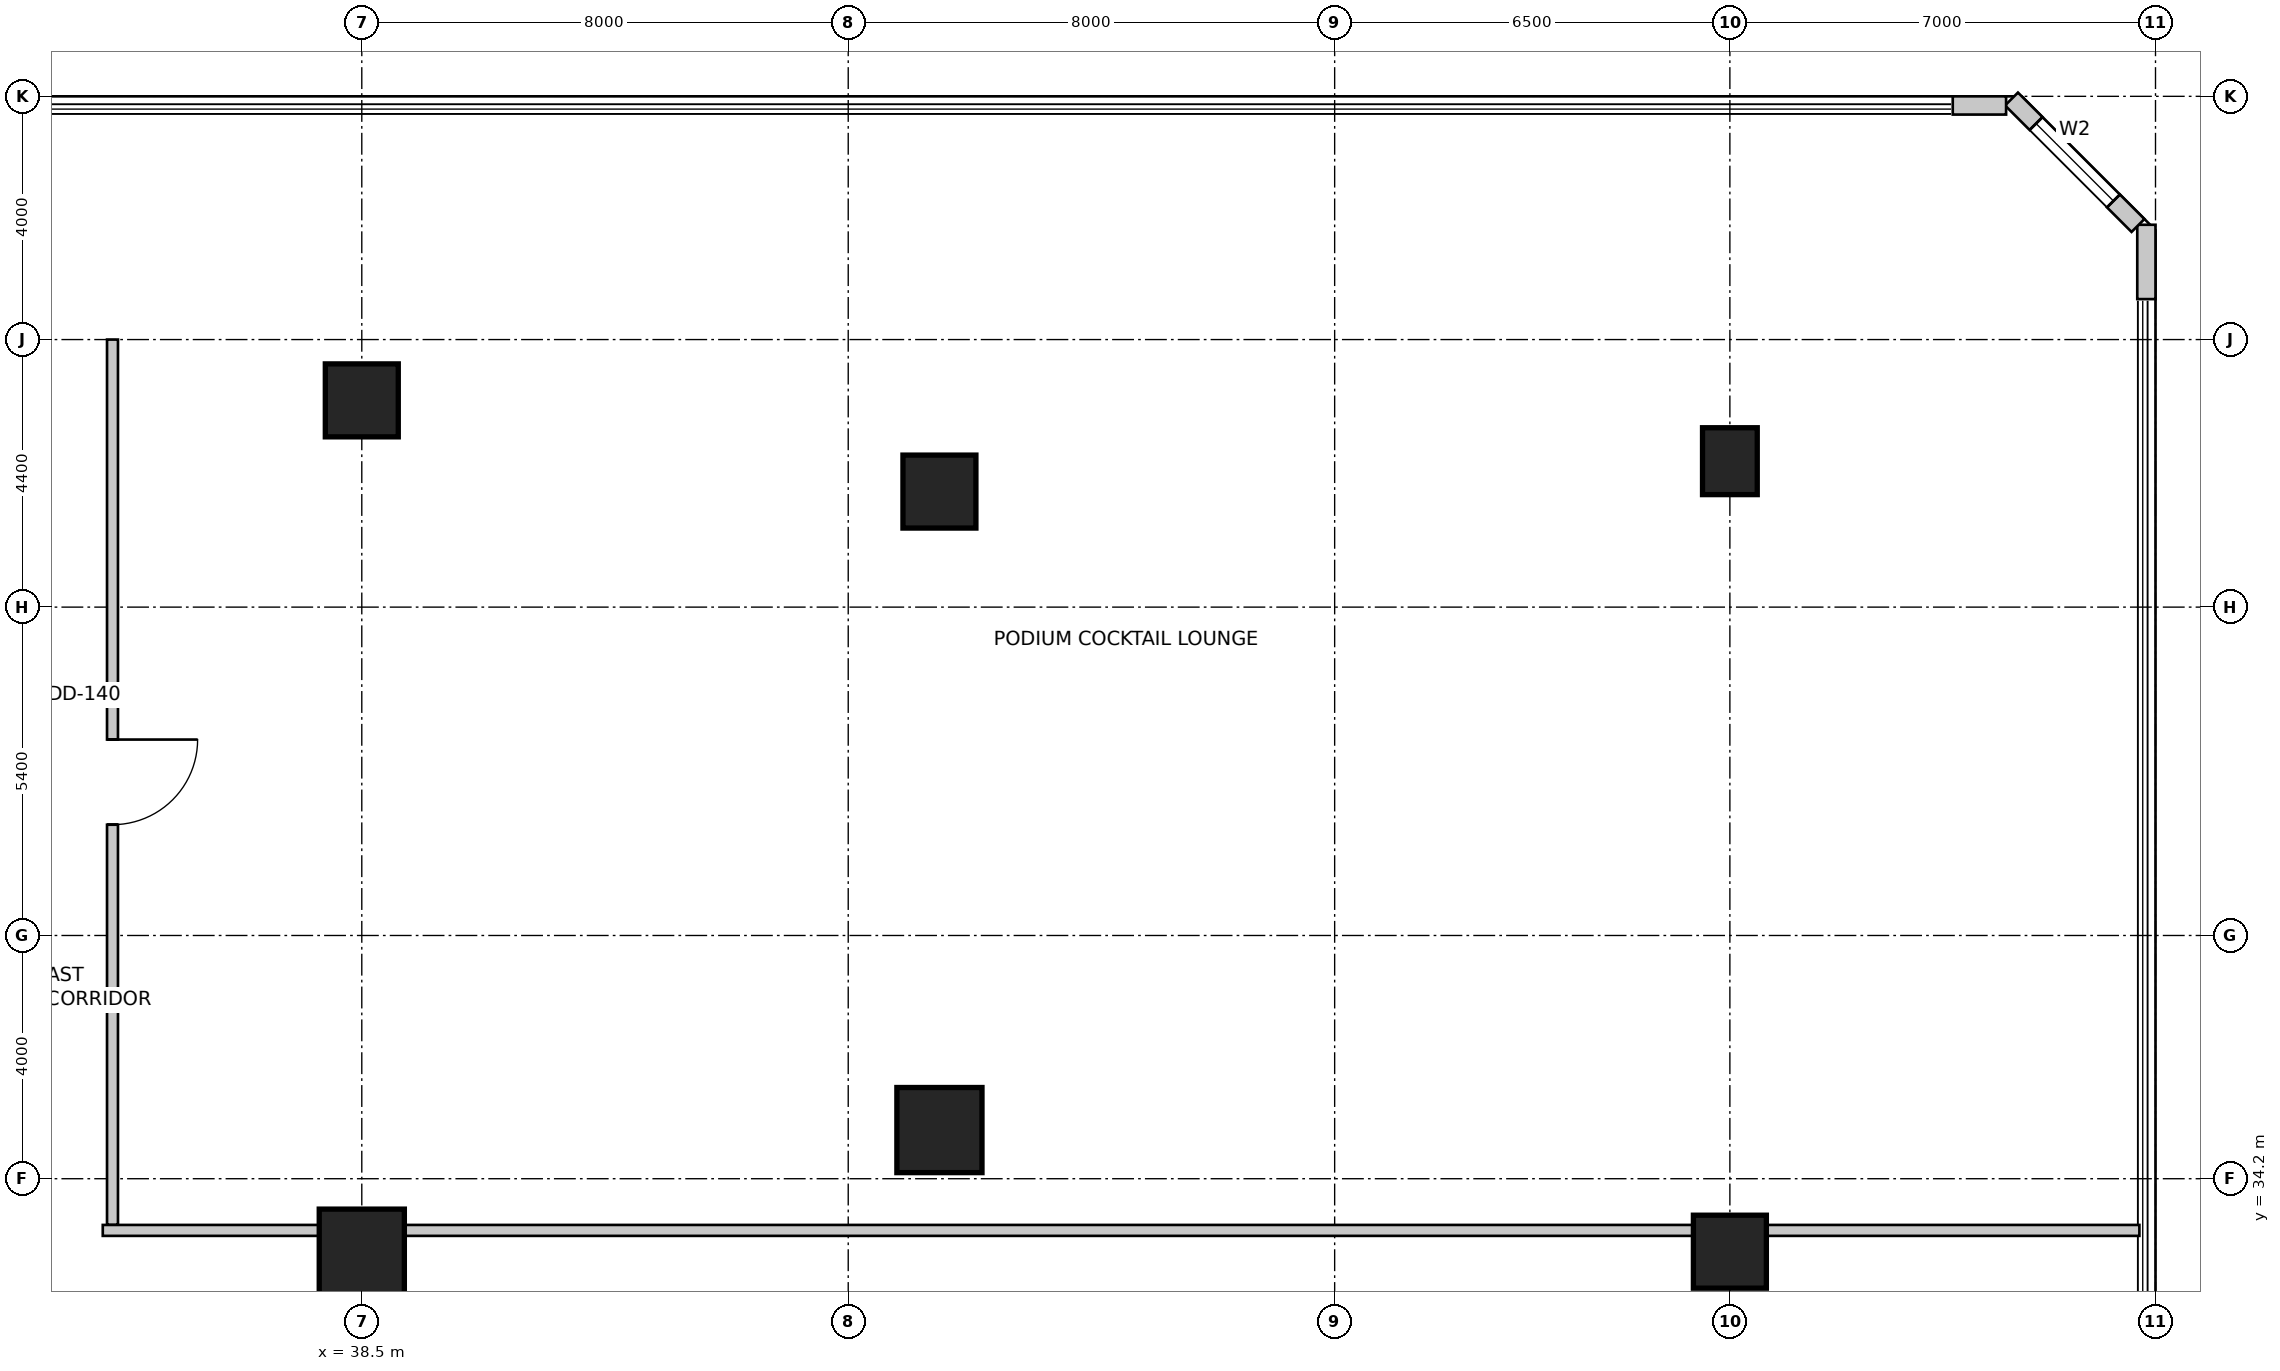
"""IFC4 building model, lengths in metres.
Left out: names, types, materials, properties, quantities, classifications, styles, units other than length and angle.
Written with IfcOpenShell. Run it as: python <this file> out.ifc"""

import sys

from ifc_helpers import new_model, si_unit, direction, frame, frame_2d, origin, origin_2d, place, context, subcontext, project, spatial, rectangle, extrude, source, transform, mapped, element, fill, save


model = new_model("IFC4")
c1 = context("Model", 3, precision=1e-05, world=origin(), true_north=direction((0.0, 1.0)))
c2 = subcontext(c1, "Body", "Model", "MODEL_VIEW")
j1 = project(units=[si_unit("LENGTHUNIT", "METRE"), si_unit("PLANEANGLEUNIT", "RADIAN")], contexts=[c1])
p1 = place(None, origin())
s1 = spatial("IfcSite", under=j1, at=p1, CompositionType="ELEMENT")
p2 = place(p1, origin())
s2 = spatial("IfcBuilding", under=s1, at=p2, CompositionType="ELEMENT")
p3 = place(p2, frame((0.0, 0.0, 16.4)))
s3 = spatial("IfcBuildingStorey", under=s2, at=p3, CompositionType="ELEMENT", Elevation=16.4)
m1 = source(origin(), c2, "Body", "SweptSolid", [
    extrude(rectangle(XDim=1.4, YDim=1.4, at=origin_2d()), origin(), (0.0, 0.0, 1.0), 5.2),
])
for number, where, z_axis, x_axis in (
    (1, (38.5, 33.0, 0.0), (0.0, 0.0, 1.0), (1.0, 0.0, 0.0)),
    (2, (48.0, 35.0, 0.0), (0.0, 0.0, 1.0), (1.0, 0.0, 0.0)),
):
    element("IfcColumn", number, at=place(p3, frame(where, z_axis=z_axis, x_axis=x_axis)), inside=s3, PredefinedType="COLUMN", context=c2, shape_type="MappedRepresentation", body=[
        mapped(m1, transform((0.0, 0.0, 0.0), scale=1.0)),
    ])
m2 = source(origin(), c2, "Body", "SweptSolid", [
    extrude(rectangle(XDim=1.2, YDim=1.2, at=origin_2d()), origin(), (0.0, 0.0, 1.0), 5.2),
])
for number, where, z_axis, x_axis in (
    (3, (61.0, 33.0, 0.0), (0.0, 0.0, 1.0), (1.0, 0.0, 0.0)),
    (4, (38.5, 47.0, 0.0), (0.0, 0.0, 1.0), (1.0, 0.0, 0.0)),
    (5, (48.0, 45.5, 0.0), (0.0, 0.0, 1.0), (1.0, 0.0, 0.0)),
):
    element("IfcColumn", number, at=place(p3, frame(where, z_axis=z_axis, x_axis=x_axis)), inside=s3, PredefinedType="COLUMN", context=c2, shape_type="MappedRepresentation", body=[
        mapped(m2, transform((0.0, 0.0, 0.0), scale=1.0)),
    ])
m3 = source(origin(), c2, "Body", "SweptSolid", [
    extrude(rectangle(XDim=0.9, YDim=1.1, at=origin_2d()), origin(), (0.0, 0.0, 1.0), 5.2),
])
p4 = place(p3, frame((61.0, 46.0, 0.0), z_axis=(0.0, 0.0, 1.0), x_axis=(1.0, 0.0, 0.0)))
e6 = element("IfcColumn", 6, at=p4, inside=s3, PredefinedType="COLUMN", context=c2, shape_type="MappedRepresentation", body=[
    mapped(m3, transform((0.0, 0.0, 0.0), scale=1.0)),
])
p5 = place(p3, frame((67.85, 48.665, 0.0), z_axis=(0.0, 0.0, 1.0), x_axis=(0.0, 1.0, 0.0)))
e7 = element("IfcWall", 7, at=p5, inside=s3, PredefinedType="SOLIDWALL", context=c2, shape_type="SweptSolid", body=[
    extrude(rectangle(XDim=1.223, YDim=0.3, at=frame_2d((0.611, 0.0))), origin(), (0.0, 0.0, 1.0), 4.85),
])
p6 = place(p3, frame((67.712, 49.876, 0.0), z_axis=(0.0, 0.0, 1.0), x_axis=(-0.707106781187, 0.707106781187, 0.0)))
e8 = element("IfcWall", 8, at=p6, inside=s3, PredefinedType="SOLIDWALL", context=c2, shape_type="SweptSolid", body=[
    extrude(rectangle(XDim=2.942, YDim=0.3, at=frame_2d((1.471, 0.0))), origin(), (0.0, 0.0, 1.0), 4.85),
])
m4 = source(origin(), c2, "Body", "SweptSolid", [
    extrude(rectangle(XDim=1.8, YDim=2.1, at=frame_2d((0.9, 1.05))), frame((0.0, 0.16, 0.0), z_axis=(0.0, -1.0, 0.0), x_axis=(1.0, 0.0, 0.0)), (0.0, 0.0, 1.0), 0.32),
])
p7 = place(p6, frame((0.571, 0.0, 0.85)))
e9 = element("IfcOpeningElement", 9, at=p7, cuts=e8, PredefinedType="OPENING", context=c2, shape_type="MappedRepresentation", body=[
    mapped(m4, transform((0.0, 0.0, 0.0), scale=1.0)),
])
p8 = place(p3, frame((65.543, 51.85, 0.0), z_axis=(0.0, 0.0, 1.0), x_axis=(-1.0, 0.0, 0.0)))
e10 = element("IfcWall", 10, at=p8, inside=s3, PredefinedType="SOLIDWALL", context=c2, shape_type="SweptSolid", body=[
    extrude(rectangle(XDim=0.877, YDim=0.3, at=frame_2d((0.439, 0.0))), origin(), (0.0, 0.0, 1.0), 4.85),
])
p9 = place(p3, frame((34.24, 33.35, 0.0), z_axis=(0.0, 0.0, 1.0), x_axis=(1.0, 0.0, 0.0)))
e11 = element("IfcWall", 11, at=p9, inside=s3, PredefinedType="PARTITIONING", context=c2, shape_type="SweptSolid", body=[
    extrude(rectangle(XDim=33.495, YDim=0.18, at=frame_2d((16.748, 0.0))), origin(), (0.0, 0.0, 1.0), 3.042),
])
p10 = place(p3, frame((34.4, 48.0, 0.0), z_axis=(0.0, 0.0, 1.0), x_axis=(0.0, -1.0, 0.0)))
e12 = element("IfcWall", 12, at=p10, inside=s3, PredefinedType="PARTITIONING", context=c2, shape_type="SweptSolid", body=[
    extrude(rectangle(XDim=14.556, YDim=0.18, at=frame_2d((7.278, 0.0))), origin(), (0.0, 0.0, 1.0), 3.892),
])
m5 = source(origin(), c2, "Body", "SweptSolid", [
    extrude(rectangle(XDim=1.4, YDim=2.15, at=frame_2d((0.7, 1.075))), frame((0.0, 0.1, 0.0), z_axis=(0.0, -1.0, 0.0), x_axis=(1.0, 0.0, 0.0)), (0.0, 0.0, 1.0), 0.2),
])
p11 = place(p10, frame((6.578, 0.0, 0.0)))
e13 = element("IfcOpeningElement", 13, at=p11, cuts=e12, PredefinedType="OPENING", context=c2, shape_type="MappedRepresentation", body=[
    mapped(m5, transform((0.0, 0.0, 0.0), scale=1.0)),
])
m6 = source(origin(), c2, "Body", "SweptSolid", [
    extrude(rectangle(XDim=1.8, YDim=2.1, at=frame_2d((0.9, 1.05))), frame((0.0, -0.015, 0.0), z_axis=(0.0, -1.0, 0.0), x_axis=(1.0, 0.0, 0.0)), (0.0, 0.0, 1.0), 0.06),
])
p12 = place(p7, origin())
e14 = element("IfcWindow", 14, at=p12, inside=s3, PartitioningType="SINGLE_PANEL", PredefinedType="WINDOW", context=c2, shape_type="MappedRepresentation", body=[
    mapped(m6, transform((0.0, 0.0, 0.0), scale=1.0)),
])
fill(e9, e14)
m7 = source(origin(), c2, "Body", "SweptSolid", [
    extrude(rectangle(XDim=1.4, YDim=2.15, at=frame_2d((0.7, 1.075))), frame((0.0, 0.025, 0.0), z_axis=(0.0, -1.0, 0.0), x_axis=(1.0, 0.0, 0.0)), (0.0, 0.0, 1.0), 0.05),
])
p13 = place(p11, origin())
e15 = element("IfcDoor", 15, at=p13, inside=s3, OperationType="SINGLE_SWING_LEFT", PredefinedType="DOOR", context=c2, shape_type="MappedRepresentation", body=[
    mapped(m7, transform((0.0, 0.0, 0.0), scale=1.0)),
])
fill(e13, e15)
save(model, sys.argv[1])
